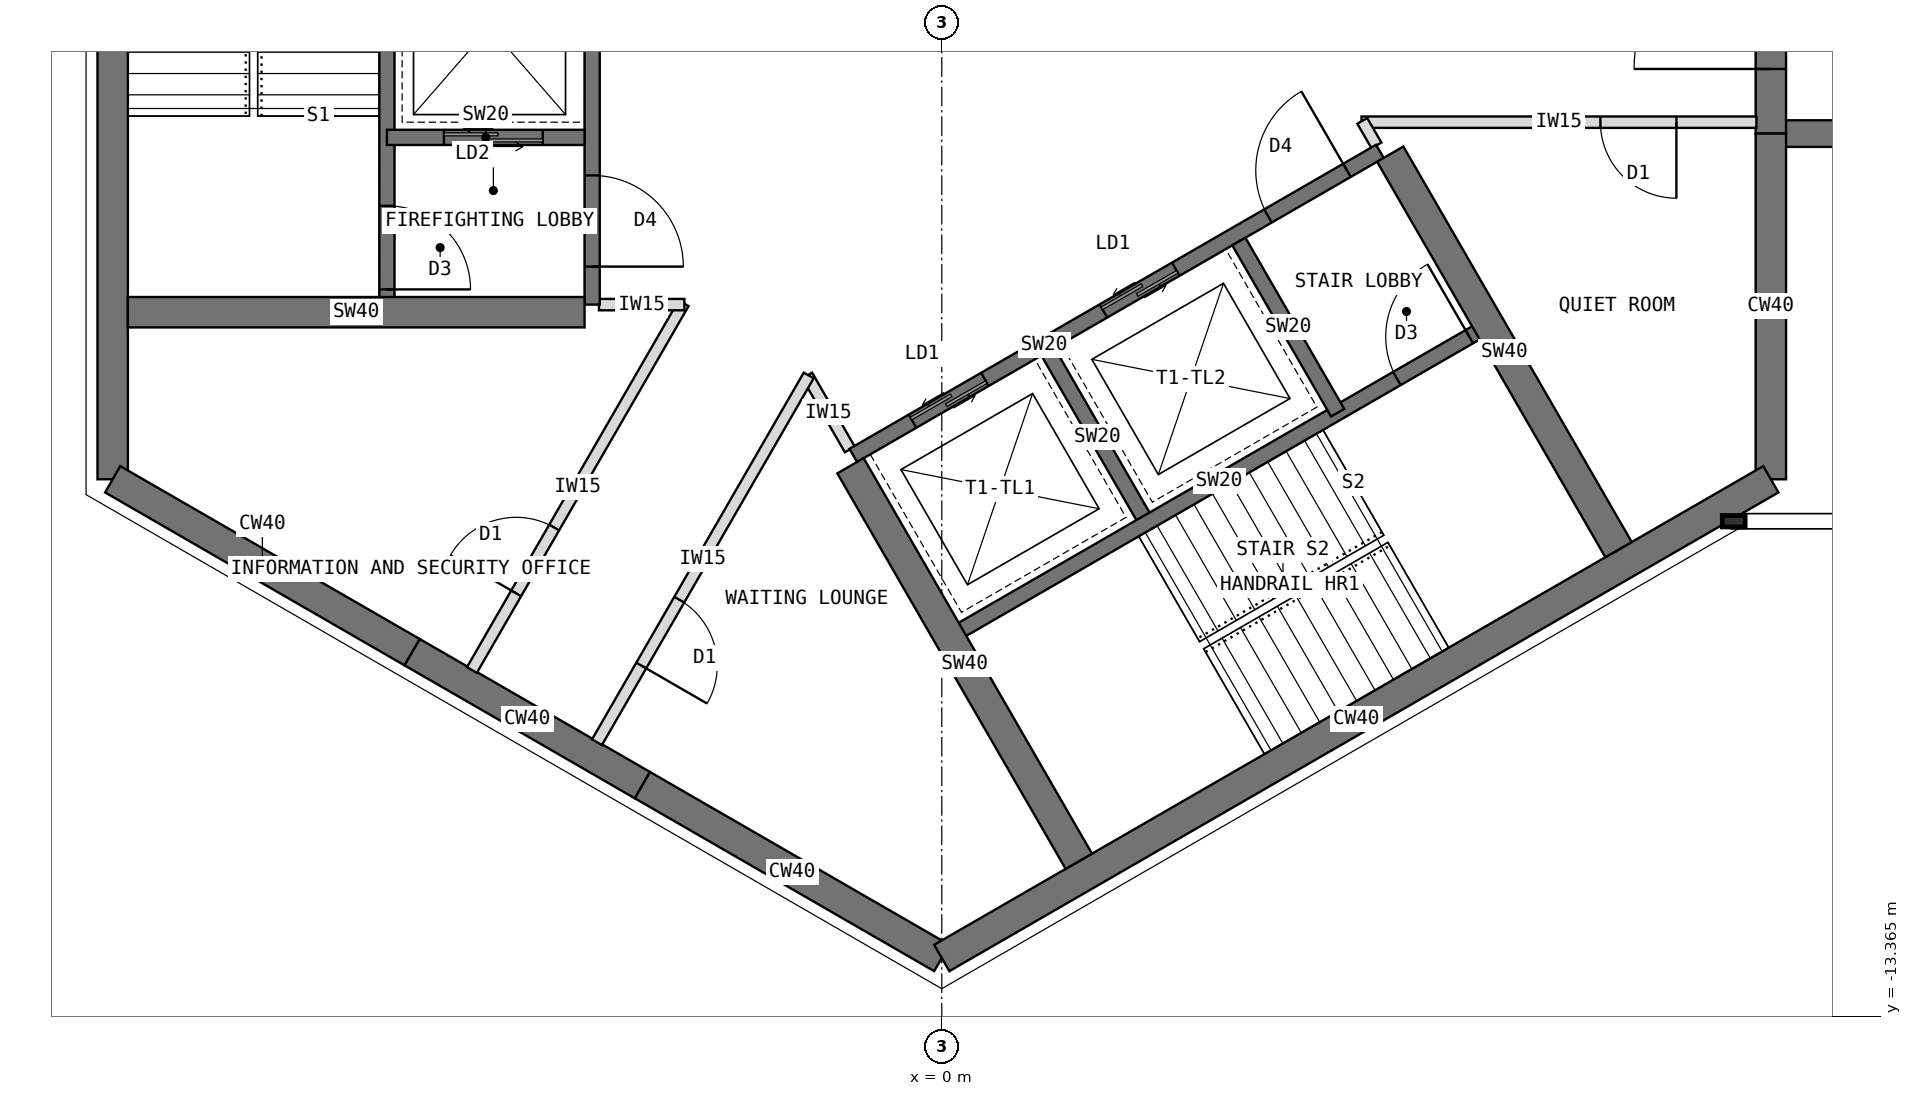
"""IFC4 building model, lengths in metres.
Left out: names, types, materials, properties, quantities, classifications, styles, units other than length and angle.
Written with IfcOpenShell. Run it as: python <this file> out.ifc"""

import sys

from ifc_helpers import new_model, si_unit, direction, frame, frame_2d, origin, place, context, subcontext, project, spatial, rectangle, extrude, element, fill, save


model = new_model("IFC4")
c1 = context("Model", 3, precision=1e-05, world=origin(), true_north=direction((0.0, 1.0)))
c2 = subcontext(c1, "Body", "Model", "MODEL_VIEW")
j1 = project(units=[si_unit("LENGTHUNIT", "METRE"), si_unit("PLANEANGLEUNIT", "RADIAN")], contexts=[c1])
p1 = place(None, origin())
s1 = spatial("IfcSite", under=j1, at=p1, CompositionType="ELEMENT")
p2 = place(p1, origin())
s2 = spatial("IfcBuilding", under=s1, at=p2, CompositionType="ELEMENT")
p3 = place(p2, frame((0.0, 0.0, 243.5)))
s3 = spatial("IfcBuildingStorey", under=s2, at=p3, CompositionType="ELEMENT", Elevation=243.5)
p4 = place(p3, frame((10.908, -6.298, 0.0), z_axis=(0.0, 0.0, 1.0), x_axis=(0.0, 1.0, 0.0)))
e1 = element("IfcWall", 1, at=p4, inside=s3, PredefinedType="SHEAR", context=c2, shape_type="SweptSolid", body=[
    extrude(rectangle(XDim=4.548, YDim=0.4, at=frame_2d((2.274, 0.0))), origin(), (0.0, 0.0, 1.0), 4.0),
])
p5 = place(p3, frame((10.908, -1.75, 0.0), z_axis=(0.0, 0.0, 1.0), x_axis=(0.0, 1.0, 0.0)))
e2 = element("IfcWall", 2, at=p5, inside=s3, PredefinedType="SHEAR", context=c2, shape_type="SweptSolid", body=[
    extrude(rectangle(XDim=3.5, YDim=0.4, at=frame_2d((1.75, 0.0))), origin(), (0.0, 0.0, 1.0), 4.0),
])
p6 = place(p5, frame((0.85, 0.0, 0.0)))
e3 = element("IfcOpeningElement", 3, at=p6, cuts=e2, PredefinedType="OPENING", context=c2, shape_type="SweptSolid", body=[
    extrude(rectangle(XDim=1.8, YDim=2.1, at=frame_2d((0.9, 1.05))), frame((0.0, 0.21, 0.0), z_axis=(0.0, -1.0, 0.0), x_axis=(1.0, 0.0, 0.0)), (0.0, 0.0, 1.0), 0.42),
])
p7 = place(p3, frame((-10.908, 6.298, 0.0), z_axis=(0.0, 0.0, 1.0), x_axis=(0.0, -1.0, 0.0)))
e4 = element("IfcWall", 4, at=p7, inside=s3, PredefinedType="SHEAR", context=c2, shape_type="SweptSolid", body=[
    extrude(rectangle(XDim=12.596, YDim=0.4, at=frame_2d((6.298, 0.0))), origin(), (0.0, 0.0, 1.0), 4.0),
])
p8 = place(p3, frame((-10.908, -6.298, 0.0), z_axis=(0.0, 0.0, 1.0), x_axis=(0.866034513004, -0.499984222037, 0.0)))
e5 = element("IfcWall", 5, at=p8, inside=s3, PredefinedType="SHEAR", context=c2, shape_type="SweptSolid", body=[
    extrude(rectangle(XDim=4.548, YDim=0.4, at=frame_2d((2.274, 0.0))), origin(), (0.0, 0.0, 1.0), 4.0),
])
p9 = place(p3, frame((-6.97, -8.572, 0.0), z_axis=(0.0, 0.0, 1.0), x_axis=(0.866019471182, -0.500010275428, 0.0)))
e6 = element("IfcWall", 6, at=p9, inside=s3, PredefinedType="SHEAR", context=c2, shape_type="SweptSolid", body=[
    extrude(rectangle(XDim=3.5, YDim=0.4, at=frame_2d((1.75, 0.0))), origin(), (0.0, 0.0, 1.0), 4.0),
])
p10 = place(p3, frame((-3.939, -10.322, 0.0), z_axis=(0.0, 0.0, 1.0), x_axis=(0.866011268655, -0.500024481964, 0.0)))
e7 = element("IfcWall", 7, at=p10, inside=s3, PredefinedType="SHEAR", context=c2, shape_type="SweptSolid", body=[
    extrude(rectangle(XDim=4.548, YDim=0.4, at=frame_2d((2.274, 0.0))), origin(), (0.0, 0.0, 1.0), 4.0),
])
p11 = place(p3, frame((0.0, -12.596, 0.0), z_axis=(0.0, 0.0, 1.0), x_axis=(0.866021940709, 0.500005998175, 0.0)))
e8 = element("IfcWall", 8, at=p11, inside=s3, PredefinedType="SHEAR", context=c2, shape_type="SweptSolid", body=[
    extrude(rectangle(XDim=12.596, YDim=0.4, at=frame_2d((6.298, 0.0))), origin(), (0.0, 0.0, 1.0), 4.0),
])
p12 = place(p3, frame((10.908, -1.75, 0.0), z_axis=(0.0, 0.0, 1.0), x_axis=(1.0, 0.0, 0.0)))
e9 = element("IfcWall", 9, at=p12, inside=s3, PredefinedType="SHEAR", context=c2, shape_type="SweptSolid", body=[
    extrude(rectangle(XDim=2.592, YDim=0.35, at=frame_2d((1.296, 0.0))), origin(), (0.0, 0.0, 1.0), 4.0),
])
p13 = place(p3, frame((-4.6, 4.0, 0.0), z_axis=(0.0, 0.0, 1.0), x_axis=(0.0, -1.0, 0.0)))
e10 = element("IfcWall", 10, at=p13, inside=s3, PredefinedType="SHEAR", context=c2, shape_type="SweptSolid", body=[
    extrude(rectangle(XDim=8.0, YDim=0.2, at=frame_2d((4.0, 0.0))), origin(), (0.0, 0.0, 1.0), 4.0),
])
p14 = place(p13, frame((6.3, 0.0, 0.0)))
e11 = element("IfcOpeningElement", 11, at=p14, cuts=e10, PredefinedType="OPENING", context=c2, shape_type="SweptSolid", body=[
    extrude(rectangle(XDim=1.2, YDim=2.1, at=frame_2d((0.6, 1.05))), frame((0.0, 0.11, 0.0), z_axis=(0.0, -1.0, 0.0), x_axis=(1.0, 0.0, 0.0)), (0.0, 0.0, 1.0), 0.22),
])
p15 = place(p13, frame((0.9, 0.0, 0.0)))
e12 = element("IfcOpeningElement", 12, at=p15, cuts=e10, PredefinedType="OPENING", context=c2, shape_type="SweptSolid", body=[
    extrude(rectangle(XDim=1.1, YDim=2.2, at=frame_2d((0.55, 1.1))), frame((0.0, 0.11, 0.0), z_axis=(0.0, -1.0, 0.0), x_axis=(1.0, 0.0, 0.0)), (0.0, 0.0, 1.0), 0.22),
])
p16 = place(p3, frame((-4.7, -1.8, 0.0), z_axis=(0.0, 0.0, 1.0), x_axis=(-1.0, 0.0, 0.0)))
e13 = element("IfcWall", 13, at=p16, inside=s3, PredefinedType="SHEAR", context=c2, shape_type="SweptSolid", body=[
    extrude(rectangle(XDim=2.6, YDim=0.2, at=frame_2d((1.3, 0.0))), origin(), (0.0, 0.0, 1.0), 4.0),
])
p17 = place(p16, frame((0.55, 0.0, 0.0)))
e14 = element("IfcOpeningElement", 14, at=p17, cuts=e13, PredefinedType="OPENING", context=c2, shape_type="SweptSolid", body=[
    extrude(rectangle(XDim=1.3, YDim=2.2, at=frame_2d((0.65, 1.1))), frame((0.0, 0.11, 0.0), z_axis=(0.0, -1.0, 0.0), x_axis=(1.0, 0.0, 0.0)), (0.0, 0.0, 1.0), 0.22),
])
p18 = place(p3, frame((-7.3, 4.0, 0.0), z_axis=(0.0, 0.0, 1.0), x_axis=(0.0, -1.0, 0.0)))
e15 = element("IfcWall", 15, at=p18, inside=s3, PredefinedType="SHEAR", context=c2, shape_type="SweptSolid", body=[
    extrude(rectangle(XDim=8.0, YDim=0.2, at=frame_2d((4.0, 0.0))), origin(), (0.0, 0.0, 1.0), 4.0),
])
p19 = place(p18, frame((6.7, 0.0, 0.0)))
e16 = element("IfcOpeningElement", 16, at=p19, cuts=e15, PredefinedType="OPENING", context=c2, shape_type="SweptSolid", body=[
    extrude(rectangle(XDim=1.1, YDim=2.1, at=frame_2d((0.55, 1.05))), frame((0.0, 0.11, 0.0), z_axis=(0.0, -1.0, 0.0), x_axis=(1.0, 0.0, 0.0)), (0.0, 0.0, 1.0), 0.22),
])
p20 = place(p3, frame((-4.7, -4.1, 0.0), z_axis=(0.0, 0.0, 1.0), x_axis=(-1.0, 0.0, 0.0)))
e17 = element("IfcWall", 17, at=p20, inside=s3, PredefinedType="SHEAR", context=c2, shape_type="SweptSolid", body=[
    extrude(rectangle(XDim=6.008, YDim=0.4, at=frame_2d((3.004, 0.0))), origin(), (0.0, 0.0, 1.0), 4.0),
])
p21 = place(p3, frame((-1.164, -5.984, 0.0), z_axis=(0.0, 0.0, 1.0), x_axis=(0.866026010844, 0.49999894854, 0.0)))
e18 = element("IfcWall", 18, at=p21, inside=s3, PredefinedType="SHEAR", context=c2, shape_type="SweptSolid", body=[
    extrude(rectangle(XDim=8.0, YDim=0.2, at=frame_2d((4.0, 0.0))), origin(), (0.0, 0.0, 1.0), 4.0),
])
p22 = place(p21, frame((6.3, 0.0, 0.0)))
e19 = element("IfcOpeningElement", 19, at=p22, cuts=e18, PredefinedType="OPENING", context=c2, shape_type="SweptSolid", body=[
    extrude(rectangle(XDim=1.2, YDim=2.1, at=frame_2d((0.6, 1.05))), frame((0.0, 0.11, 0.0), z_axis=(0.0, -1.0, 0.0), x_axis=(1.0, 0.0, 0.0)), (0.0, 0.0, 1.0), 0.22),
])
p23 = place(p21, frame((0.9, 0.0, 0.0)))
e20 = element("IfcOpeningElement", 20, at=p23, cuts=e18, PredefinedType="OPENING", context=c2, shape_type="SweptSolid", body=[
    extrude(rectangle(XDim=1.1, YDim=2.2, at=frame_2d((0.55, 1.1))), frame((0.0, 0.11, 0.0), z_axis=(0.0, -1.0, 0.0), x_axis=(1.0, 0.0, 0.0)), (0.0, 0.0, 1.0), 0.22),
])
p24 = place(p21, frame((3.8, 0.0, 0.0)))
e21 = element("IfcOpeningElement", 21, at=p24, cuts=e18, PredefinedType="OPENING", context=c2, shape_type="SweptSolid", body=[
    extrude(rectangle(XDim=1.1, YDim=2.2, at=frame_2d((0.55, 1.1))), frame((0.0, 0.11, 0.0), z_axis=(0.0, -1.0, 0.0), x_axis=(1.0, 0.0, 0.0)), (0.0, 0.0, 1.0), 0.22),
])
p25 = place(p3, frame((1.397, -4.62, 0.0), z_axis=(0.0, 0.0, 1.0), x_axis=(0.499936506574, -0.866062058628, 0.0)))
e22 = element("IfcWall", 22, at=p25, inside=s3, PredefinedType="SHEAR", context=c2, shape_type="SweptSolid", body=[
    extrude(rectangle(XDim=2.6, YDim=0.2, at=frame_2d((1.3, 0.0))), origin(), (0.0, 0.0, 1.0), 4.0),
])
p26 = place(p3, frame((3.909, -3.17, 0.0), z_axis=(0.0, 0.0, 1.0), x_axis=(0.49997716683, -0.86603858612, 0.0)))
e23 = element("IfcWall", 23, at=p26, inside=s3, PredefinedType="SHEAR", context=c2, shape_type="SweptSolid", body=[
    extrude(rectangle(XDim=2.6, YDim=0.2, at=frame_2d((1.3, 0.0))), origin(), (0.0, 0.0, 1.0), 4.0),
])
p27 = place(p3, frame((0.186, -8.322, 0.0), z_axis=(0.0, 0.0, 1.0), x_axis=(0.866026010844, 0.49999894854, 0.0)))
e24 = element("IfcWall", 24, at=p27, inside=s3, PredefinedType="SHEAR", context=c2, shape_type="SweptSolid", body=[
    extrude(rectangle(XDim=8.0, YDim=0.2, at=frame_2d((4.0, 0.0))), origin(), (0.0, 0.0, 1.0), 4.0),
])
p28 = place(p27, frame((6.7, 0.0, 0.0)))
e25 = element("IfcOpeningElement", 25, at=p28, cuts=e24, PredefinedType="OPENING", context=c2, shape_type="SweptSolid", body=[
    extrude(rectangle(XDim=1.1, YDim=2.1, at=frame_2d((0.55, 1.05))), frame((0.0, 0.11, 0.0), z_axis=(0.0, -1.0, 0.0), x_axis=(1.0, 0.0, 0.0)), (0.0, 0.0, 1.0), 0.22),
])
for number, where, z_axis, x_axis in (
    (26, (5.901, -2.02, 0.0), (0.0, 0.0, 1.0), (0.5, -0.866, 0.0)),
    (27, (-1.201, -6.12, 0.0), (0.0, 0.0, 1.0), (0.5, -0.866, 0.0)),
):
    element("IfcWall", number, at=place(p3, frame(where, z_axis=z_axis, x_axis=x_axis)), inside=s3, PredefinedType="SHEAR", context=c2, shape_type="SweptSolid", body=[
        extrude(rectangle(XDim=6.008, YDim=0.4, at=frame_2d((3.004, 0.0))), origin(), (0.0, 0.0, 1.0), 4.0),
    ])
p29 = place(p3, frame((-1.209, -5.906, 0.0), z_axis=(0.0, 0.0, 1.0), x_axis=(-0.500111091428, 0.865961255618, 0.0)))
e28 = element("IfcWall", 28, at=p29, inside=s3, PredefinedType="PARTITIONING", context=c2, shape_type="SweptSolid", body=[
    extrude(rectangle(XDim=1.124, YDim=0.15, at=frame_2d((0.562, 0.0))), origin(), (0.0, 0.0, 1.0), 3.8),
])
p30 = place(p3, frame((-1.751, -4.933, 0.0), z_axis=(0.0, 0.0, 1.0), x_axis=(-0.499980410194, -0.866036713669, 0.0)))
e29 = element("IfcWall", 29, at=p30, inside=s3, PredefinedType="PARTITIONING", context=c2, shape_type="SweptSolid", body=[
    extrude(rectangle(XDim=5.571, YDim=0.15, at=frame_2d((2.786, 0.0))), origin(), (0.0, 0.0, 1.0), 3.8),
])
p31 = place(p30, frame((3.406, 0.0, 0.0)))
e30 = element("IfcOpeningElement", 30, at=p31, cuts=e29, PredefinedType="OPENING", context=c2, shape_type="SweptSolid", body=[
    extrude(rectangle(XDim=1.0, YDim=2.1, at=frame_2d((0.5, 1.05))), frame((0.0, 0.085, 0.0), z_axis=(0.0, -1.0, 0.0), x_axis=(1.0, 0.0, 0.0)), (0.0, 0.0, 1.0), 0.17),
])
p32 = place(p3, frame((-6.182, -8.807, 0.0), z_axis=(0.0, 0.0, 1.0), x_axis=(0.499980410194, 0.866036713669, 0.0)))
e31 = element("IfcWall", 31, at=p32, inside=s3, PredefinedType="PARTITIONING", context=c2, shape_type="SweptSolid", body=[
    extrude(rectangle(XDim=5.571, YDim=0.15, at=frame_2d((2.786, 0.0))), origin(), (0.0, 0.0, 1.0), 3.8),
])
p33 = place(p32, frame((1.165, 0.0, 0.0)))
e32 = element("IfcOpeningElement", 32, at=p33, cuts=e31, PredefinedType="OPENING", context=c2, shape_type="SweptSolid", body=[
    extrude(rectangle(XDim=1.0, YDim=2.1, at=frame_2d((0.5, 1.05))), frame((0.0, 0.085, 0.0), z_axis=(0.0, -1.0, 0.0), x_axis=(1.0, 0.0, 0.0)), (0.0, 0.0, 1.0), 0.17),
])
p34 = place(p3, frame((-3.386, -4.0, 0.0), z_axis=(0.0, 0.0, 1.0), x_axis=(-1.0, 0.0, 0.0)))
e33 = element("IfcWall", 33, at=p34, inside=s3, PredefinedType="PARTITIONING", context=c2, shape_type="SweptSolid", body=[
    extrude(rectangle(XDim=1.124, YDim=0.15, at=frame_2d((0.562, 0.0))), origin(), (0.0, 0.0, 1.0), 3.8),
])
p35 = place(p3, frame((10.718, -1.6, 0.0), z_axis=(0.0, 0.0, 1.0), x_axis=(-1.0, 0.0, 0.0)))
e34 = element("IfcWall", 34, at=p35, inside=s3, PredefinedType="PARTITIONING", context=c2, shape_type="SweptSolid", body=[
    extrude(rectangle(XDim=5.196, YDim=0.15, at=frame_2d((2.598, 0.0))), origin(), (0.0, 0.0, 1.0), 3.8),
])
p36 = place(p35, frame((1.053, 0.0, 0.0)))
e35 = element("IfcOpeningElement", 35, at=p36, cuts=e34, PredefinedType="OPENING", context=c2, shape_type="SweptSolid", body=[
    extrude(rectangle(XDim=1.0, YDim=2.1, at=frame_2d((0.5, 1.05))), frame((0.0, 0.085, 0.0), z_axis=(0.0, -1.0, 0.0), x_axis=(1.0, 0.0, 0.0)), (0.0, 0.0, 1.0), 0.17),
])
p37 = place(p3, frame((5.533, -1.583, 0.0), z_axis=(0.0, 0.0, 1.0), x_axis=(0.499590185398, -0.866261881104, 0.0)))
e36 = element("IfcWall", 36, at=p37, inside=s3, PredefinedType="PARTITIONING", context=c2, shape_type="SweptSolid", body=[
    extrude(rectangle(XDim=0.373, YDim=0.15, at=frame_2d((0.187, 0.0))), origin(), (0.0, 0.0, 1.0), 3.8),
])
p38 = place(p14, origin())
e37 = element("IfcDoor", 37, at=p38, inside=s3, OperationType="SINGLE_SWING_RIGHT", PredefinedType="DOOR", context=c2, shape_type="SweptSolid", body=[
    extrude(rectangle(XDim=1.2, YDim=2.1, at=frame_2d((0.6, 1.05))), frame((0.0, 0.025, 0.0), z_axis=(0.0, -1.0, 0.0), x_axis=(1.0, 0.0, 0.0)), (0.0, 0.0, 1.0), 0.05),
])
fill(e11, e37)
p39 = place(p17, origin())
e38 = element("IfcDoor", 38, at=p39, inside=s3, OperationType="DOUBLE_DOOR_SLIDING", PredefinedType="DOOR", context=c2, shape_type="SweptSolid", body=[
    extrude(rectangle(XDim=1.3, YDim=2.2, at=frame_2d((0.65, 1.1))), frame((0.0, 0.025, 0.0), z_axis=(0.0, -1.0, 0.0), x_axis=(1.0, 0.0, 0.0)), (0.0, 0.0, 1.0), 0.05),
])
fill(e14, e38)
p40 = place(p19, origin())
e39 = element("IfcDoor", 39, at=p40, inside=s3, OperationType="SINGLE_SWING_RIGHT", PredefinedType="DOOR", context=c2, shape_type="SweptSolid", body=[
    extrude(rectangle(XDim=1.1, YDim=2.1, at=frame_2d((0.55, 1.05))), frame((0.0, 0.025, 0.0), z_axis=(0.0, -1.0, 0.0), x_axis=(1.0, 0.0, 0.0)), (0.0, 0.0, 1.0), 0.05),
])
fill(e16, e39)
p41 = place(p22, origin())
e40 = element("IfcDoor", 40, at=p41, inside=s3, OperationType="SINGLE_SWING_RIGHT", PredefinedType="DOOR", context=c2, shape_type="SweptSolid", body=[
    extrude(rectangle(XDim=1.2, YDim=2.1, at=frame_2d((0.6, 1.05))), frame((0.0, 0.025, 0.0), z_axis=(0.0, -1.0, 0.0), x_axis=(1.0, 0.0, 0.0)), (0.0, 0.0, 1.0), 0.05),
])
fill(e19, e40)
p42 = place(p23, origin())
e41 = element("IfcDoor", 41, at=p42, inside=s3, OperationType="DOUBLE_DOOR_SLIDING", PredefinedType="DOOR", context=c2, shape_type="SweptSolid", body=[
    extrude(rectangle(XDim=1.1, YDim=2.2, at=frame_2d((0.55, 1.1))), frame((0.0, 0.025, 0.0), z_axis=(0.0, -1.0, 0.0), x_axis=(1.0, 0.0, 0.0)), (0.0, 0.0, 1.0), 0.05),
])
fill(e20, e41)
p43 = place(p24, origin())
e42 = element("IfcDoor", 42, at=p43, inside=s3, OperationType="DOUBLE_DOOR_SLIDING", PredefinedType="DOOR", context=c2, shape_type="SweptSolid", body=[
    extrude(rectangle(XDim=1.1, YDim=2.2, at=frame_2d((0.55, 1.1))), frame((0.0, 0.025, 0.0), z_axis=(0.0, -1.0, 0.0), x_axis=(1.0, 0.0, 0.0)), (0.0, 0.0, 1.0), 0.05),
])
fill(e21, e42)
p44 = place(p28, origin())
e43 = element("IfcDoor", 43, at=p44, inside=s3, OperationType="SINGLE_SWING_RIGHT", PredefinedType="DOOR", context=c2, shape_type="SweptSolid", body=[
    extrude(rectangle(XDim=1.1, YDim=2.1, at=frame_2d((0.55, 1.05))), frame((0.0, 0.025, 0.0), z_axis=(0.0, -1.0, 0.0), x_axis=(1.0, 0.0, 0.0)), (0.0, 0.0, 1.0), 0.05),
])
fill(e25, e43)
p45 = place(p6, origin())
e44 = element("IfcDoor", 44, at=p45, inside=s3, OperationType="DOUBLE_DOOR_DOUBLE_SWING", PredefinedType="DOOR", context=c2, shape_type="SweptSolid", body=[
    extrude(rectangle(XDim=1.8, YDim=2.1, at=frame_2d((0.9, 1.05))), frame((0.0, 0.025, 0.0), z_axis=(0.0, -1.0, 0.0), x_axis=(1.0, 0.0, 0.0)), (0.0, 0.0, 1.0), 0.05),
])
fill(e3, e44)
p46 = place(p33, origin())
e45 = element("IfcDoor", 45, at=p46, inside=s3, OperationType="SINGLE_SWING_LEFT", PredefinedType="DOOR", context=c2, shape_type="SweptSolid", body=[
    extrude(rectangle(XDim=1.0, YDim=2.1, at=frame_2d((0.5, 1.05))), frame((0.0, 0.025, 0.0), z_axis=(0.0, -1.0, 0.0), x_axis=(1.0, 0.0, 0.0)), (0.0, 0.0, 1.0), 0.05),
])
fill(e32, e45)
p47 = place(p31, origin())
e46 = element("IfcDoor", 46, at=p47, inside=s3, OperationType="SINGLE_SWING_RIGHT", PredefinedType="DOOR", context=c2, shape_type="SweptSolid", body=[
    extrude(rectangle(XDim=1.0, YDim=2.1, at=frame_2d((0.5, 1.05))), frame((0.0, 0.025, 0.0), z_axis=(0.0, -1.0, 0.0), x_axis=(1.0, 0.0, 0.0)), (0.0, 0.0, 1.0), 0.05),
])
fill(e30, e46)
p48 = place(p36, origin())
e47 = element("IfcDoor", 47, at=p48, inside=s3, OperationType="SINGLE_SWING_LEFT", PredefinedType="DOOR", context=c2, shape_type="SweptSolid", body=[
    extrude(rectangle(XDim=1.0, YDim=2.1, at=frame_2d((0.5, 1.05))), frame((0.0, 0.025, 0.0), z_axis=(0.0, -1.0, 0.0), x_axis=(1.0, 0.0, 0.0)), (0.0, 0.0, 1.0), 0.05),
])
fill(e35, e47)
save(model, sys.argv[1])
